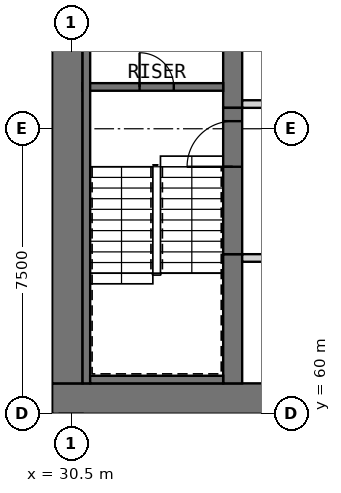
"""IFC4 building model, lengths in metres.
Left out: names, types, materials, properties, quantities, classifications, styles, units other than length and angle.
Written with IfcOpenShell. Run it as: python <this file> out.ifc"""

import sys

from ifc_helpers import new_model, si_unit, direction, frame, frame_2d, origin, place, context, subcontext, project, spatial, rectangle, extrude, element, fill, save


model = new_model("IFC4")
c1 = context("Model", 3, precision=1e-05, world=origin(), true_north=direction((0.0, 1.0)))
c2 = subcontext(c1, "Body", "Model", "MODEL_VIEW")
j1 = project(units=[si_unit("LENGTHUNIT", "METRE"), si_unit("PLANEANGLEUNIT", "RADIAN")], contexts=[c1])
p1 = place(None, origin())
s1 = spatial("IfcSite", under=j1, at=p1, CompositionType="ELEMENT")
p2 = place(p1, origin())
s2 = spatial("IfcBuilding", under=s1, at=p2, CompositionType="ELEMENT")
p3 = place(p2, frame((0.0, 0.0, 133.8)))
s3 = spatial("IfcBuildingStorey", under=s2, at=p3, CompositionType="ELEMENT", Elevation=133.8)
p4 = place(p3, frame((30.0, 60.4, 0.0), z_axis=(0.0, 0.0, 1.0), x_axis=(1.0, 0.0, 0.0)))
e1 = element("IfcWall", 1, at=p4, inside=s3, PredefinedType="SHEAR", context=c2, shape_type="SweptSolid", body=[
    extrude(rectangle(XDim=30.0, YDim=0.8, at=frame_2d((15.0, 0.0))), origin(), (0.0, 0.0, 1.0), 3.6),
])
p5 = place(p4, frame((21.9, 0.0, 0.0)))
e2 = element("IfcOpeningElement", 2, at=p5, cuts=e1, PredefinedType="OPENING", context=c2, shape_type="SweptSolid", body=[
    extrude(rectangle(XDim=1.8, YDim=2.1, at=frame_2d((0.9, 1.05))), frame((0.0, 0.41, 0.0), z_axis=(0.0, -1.0, 0.0), x_axis=(1.0, 0.0, 0.0)), (0.0, 0.0, 1.0), 0.82),
])
p6 = place(p4, frame((26.5, 0.0, 0.0)))
e3 = element("IfcOpeningElement", 3, at=p6, cuts=e1, PredefinedType="OPENING", context=c2, shape_type="SweptSolid", body=[
    extrude(rectangle(XDim=1.2, YDim=2.1, at=frame_2d((0.6, 1.05))), frame((0.0, 0.41, 0.0), z_axis=(0.0, -1.0, 0.0), x_axis=(1.0, 0.0, 0.0)), (0.0, 0.0, 1.0), 0.82),
])
p7 = place(p3, frame((30.4, 60.8, 0.0), z_axis=(0.0, 0.0, 1.0), x_axis=(0.0, 1.0, 0.0)))
e4 = element("IfcWall", 4, at=p7, inside=s3, PredefinedType="SHEAR", context=c2, shape_type="SweptSolid", body=[
    extrude(rectangle(XDim=20.9, YDim=0.8, at=frame_2d((10.45, 0.0))), origin(), (0.0, 0.0, 1.0), 3.6),
])
p8 = place(p3, frame((34.75, 60.8, 0.0), z_axis=(0.0, 0.0, 1.0), x_axis=(0.0, 1.0, 0.0)))
e5 = element("IfcWall", 5, at=p8, inside=s3, PredefinedType="SHEAR", context=c2, shape_type="SweptSolid", body=[
    extrude(rectangle(XDim=3.4, YDim=0.5, at=frame_2d((1.7, 0.0))), origin(), (0.0, 0.0, 1.0), 3.6),
])
p9 = place(p3, frame((34.75, 68.05, 0.0), z_axis=(0.0, 0.0, 1.0), x_axis=(0.0, 1.0, 0.0)))
e6 = element("IfcWall", 6, at=p9, inside=s3, PredefinedType="SHEAR", context=c2, shape_type="SweptSolid", body=[
    extrude(rectangle(XDim=6.4, YDim=0.5, at=frame_2d((3.2, 0.0))), origin(), (0.0, 0.0, 1.0), 3.6),
])
p10 = place(p3, frame((35.0, 64.1, 0.0), z_axis=(0.0, 0.0, 1.0), x_axis=(1.0, 0.0, 0.0)))
e7 = element("IfcWall", 7, at=p10, inside=s3, PredefinedType="PARTITIONING", context=c2, shape_type="SweptSolid", body=[
    extrude(rectangle(XDim=15.6, YDim=0.2, at=frame_2d((7.8, 0.0))), origin(), (0.0, 0.0, 1.0), 3.35),
])
p11 = place(p10, frame((3.525, 0.0, 0.0)))
e8 = element("IfcOpeningElement", 8, at=p11, cuts=e7, PredefinedType="OPENING", context=c2, shape_type="SweptSolid", body=[
    extrude(rectangle(XDim=0.9, YDim=2.1, at=frame_2d((0.45, 1.05))), frame((0.0, 0.11, 0.0), z_axis=(0.0, -1.0, 0.0), x_axis=(1.0, 0.0, 0.0)), (0.0, 0.0, 1.0), 0.22),
])
p12 = place(p10, frame((11.325, 0.0, 0.0)))
e9 = element("IfcOpeningElement", 9, at=p12, cuts=e7, PredefinedType="OPENING", context=c2, shape_type="SweptSolid", body=[
    extrude(rectangle(XDim=0.9, YDim=2.1, at=frame_2d((0.45, 1.05))), frame((0.0, 0.11, 0.0), z_axis=(0.0, -1.0, 0.0), x_axis=(1.0, 0.0, 0.0)), (0.0, 0.0, 1.0), 0.22),
])
p13 = place(p3, frame((35.0, 68.15, 0.0), z_axis=(0.0, 0.0, 1.0), x_axis=(1.0, 0.0, 0.0)))
e10 = element("IfcWall", 10, at=p13, inside=s3, PredefinedType="PARTITIONING", context=c2, shape_type="SweptSolid", body=[
    extrude(rectangle(XDim=15.6, YDim=0.2, at=frame_2d((7.8, 0.0))), origin(), (0.0, 0.0, 1.0), 3.35),
])
p14 = place(p13, frame((2.6, 0.0, 0.0)))
e11 = element("IfcOpeningElement", 11, at=p14, cuts=e10, PredefinedType="OPENING", context=c2, shape_type="SweptSolid", body=[
    extrude(rectangle(XDim=0.9, YDim=2.1, at=frame_2d((0.45, 1.05))), frame((0.0, 0.11, 0.0), z_axis=(0.0, -1.0, 0.0), x_axis=(1.0, 0.0, 0.0)), (0.0, 0.0, 1.0), 0.22),
])
p15 = place(p13, frame((10.4, 0.0, 0.0)))
e12 = element("IfcOpeningElement", 12, at=p15, cuts=e10, PredefinedType="OPENING", context=c2, shape_type="SweptSolid", body=[
    extrude(rectangle(XDim=0.9, YDim=2.1, at=frame_2d((0.45, 1.05))), frame((0.0, 0.11, 0.0), z_axis=(0.0, -1.0, 0.0), x_axis=(1.0, 0.0, 0.0)), (0.0, 0.0, 1.0), 0.22),
])
p16 = place(p3, frame((34.75, 64.2, 0.0), z_axis=(0.0, 0.0, 1.0), x_axis=(0.0, 1.0, 0.0)))
e13 = element("IfcWall", 13, at=p16, inside=s3, PredefinedType="SOLIDWALL", context=c2, shape_type="SweptSolid", body=[
    extrude(rectangle(XDim=3.85, YDim=0.5, at=frame_2d((1.925, 0.0))), origin(), (0.0, 0.0, 1.0), 2.4),
])
p17 = place(p16, frame((2.3, 0.0, 0.0)))
e14 = element("IfcOpeningElement", 14, at=p17, cuts=e13, PredefinedType="OPENING", context=c2, shape_type="SweptSolid", body=[
    extrude(rectangle(XDim=1.2, YDim=2.1, at=frame_2d((0.6, 1.05))), frame((0.0, 0.26, 0.0), z_axis=(0.0, -1.0, 0.0), x_axis=(1.0, 0.0, 0.0)), (0.0, 0.0, 1.0), 0.52),
])
p18 = place(p3, frame((30.8, 68.6, 0.0), z_axis=(0.0, 0.0, 1.0), x_axis=(1.0, 0.0, 0.0)))
e15 = element("IfcWall", 15, at=p18, inside=s3, PredefinedType="SOLIDWALL", context=c2, shape_type="SweptSolid", body=[
    extrude(rectangle(XDim=3.7, YDim=0.2, at=frame_2d((1.85, 0.0))), origin(), (0.0, 0.0, 1.0), 3.35),
])
p19 = place(p18, frame((1.5, 0.0, 0.0)))
e16 = element("IfcOpeningElement", 16, at=p19, cuts=e15, PredefinedType="OPENING", context=c2, shape_type="SweptSolid", body=[
    extrude(rectangle(XDim=0.9, YDim=2.1, at=frame_2d((0.45, 1.05))), frame((0.0, 0.11, 0.0), z_axis=(0.0, -1.0, 0.0), x_axis=(1.0, 0.0, 0.0)), (0.0, 0.0, 1.0), 0.22),
])
p20 = place(p3, frame((30.9, 60.8, 0.0), z_axis=(0.0, 0.0, 1.0), x_axis=(0.0, 1.0, 0.0)))
e17 = element("IfcWall", 17, at=p20, inside=s3, PredefinedType="SOLIDWALL", context=c2, shape_type="SweptSolid", body=[
    extrude(rectangle(XDim=20.9, YDim=0.2, at=frame_2d((10.45, 0.0))), origin(), (0.0, 0.0, 1.0), 3.35),
])
p21 = place(p3, frame((31.0, 60.9, 0.0), z_axis=(0.0, 0.0, 1.0), x_axis=(1.0, 0.0, 0.0)))
e18 = element("IfcWall", 18, at=p21, inside=s3, PredefinedType="SOLIDWALL", context=c2, shape_type="SweptSolid", body=[
    extrude(rectangle(XDim=3.5, YDim=0.2, at=frame_2d((1.75, 0.0))), origin(), (0.0, 0.0, 1.0), 3.35),
])
p22 = place(p17, origin())
e19 = element("IfcDoor", 19, at=p22, inside=s3, OperationType="SINGLE_SWING_LEFT", PredefinedType="DOOR", context=c2, shape_type="SweptSolid", body=[
    extrude(rectangle(XDim=1.2, YDim=2.1, at=frame_2d((0.6, 1.05))), frame((0.0, 0.025, 0.0), z_axis=(0.0, -1.0, 0.0), x_axis=(1.0, 0.0, 0.0)), (0.0, 0.0, 1.0), 0.05),
])
fill(e14, e19)
p23 = place(p19, origin())
e20 = element("IfcDoor", 20, at=p23, inside=s3, OperationType="SINGLE_SWING_LEFT", PredefinedType="DOOR", context=c2, shape_type="SweptSolid", body=[
    extrude(rectangle(XDim=0.9, YDim=2.1, at=frame_2d((0.45, 1.05))), frame((0.0, 0.025, 0.0), z_axis=(0.0, -1.0, 0.0), x_axis=(1.0, 0.0, 0.0)), (0.0, 0.0, 1.0), 0.05),
])
fill(e16, e20)
save(model, sys.argv[1])
